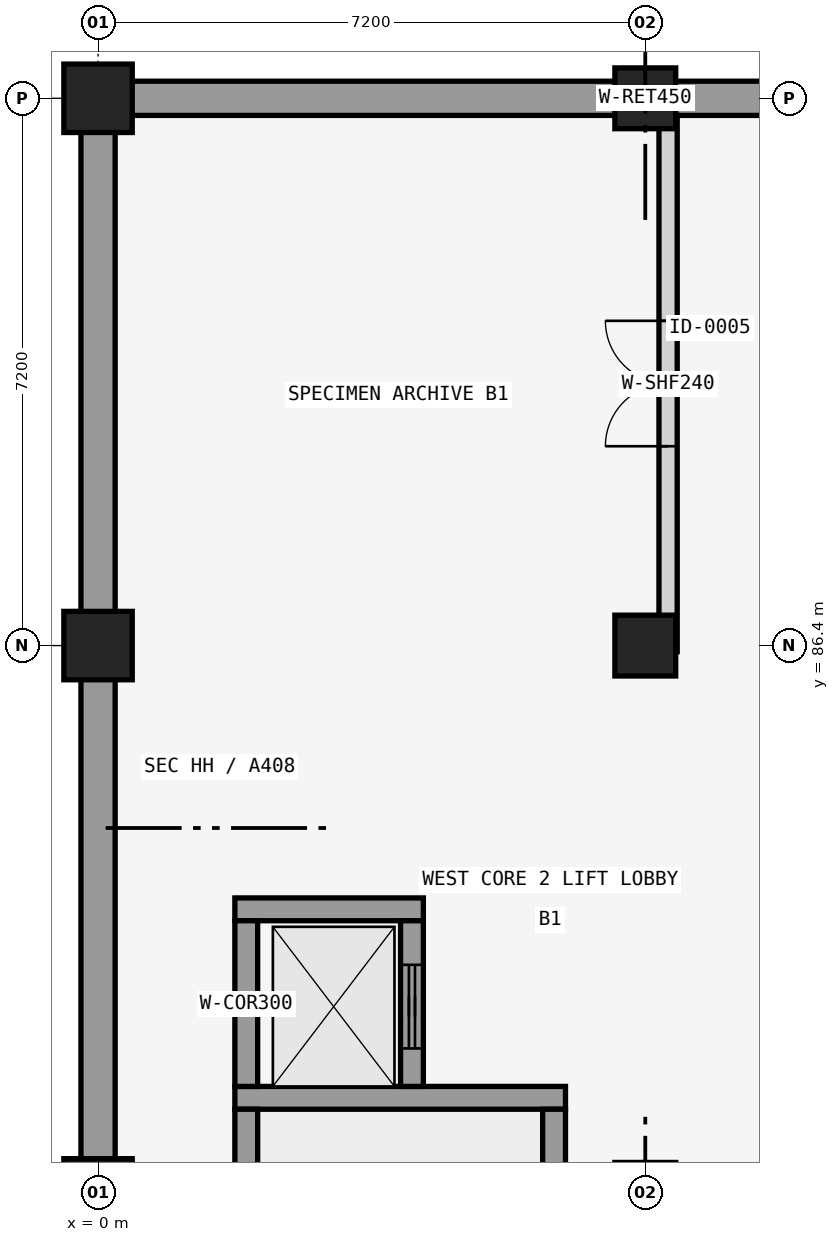
"""IFC4 building model, lengths in metres.
Left out: names, types, materials, properties, quantities, classifications, styles, units other than length and angle.
Written with IfcOpenShell. Run it as: python <this file> out.ifc"""

import sys

from ifc_helpers import new_model, si_unit, direction, frame, frame_2d, origin, origin_2d, place, context, subcontext, project, spatial, rectangle, extrude, element, fill, save


model = new_model("IFC4")
c1 = context("Model", 3, precision=1e-05, world=origin(), true_north=direction((0.0, 1.0)))
c2 = subcontext(c1, "Body", "Model", "MODEL_VIEW")
j1 = project(units=[si_unit("LENGTHUNIT", "METRE"), si_unit("PLANEANGLEUNIT", "RADIAN")], contexts=[c1])
p1 = place(None, origin())
s1 = spatial("IfcSite", under=j1, at=p1, CompositionType="ELEMENT")
p2 = place(p1, origin())
s2 = spatial("IfcBuilding", under=s1, at=p2, CompositionType="ELEMENT")
p3 = place(p2, frame((0.0, 0.0, -4.8)))
s3 = spatial("IfcBuildingStorey", under=s2, at=p3, CompositionType="ELEMENT", Elevation=-4.8)
for number, where, z_axis, x_axis in (
    (1, (0.0, 79.2, 0.0), (0.0, 0.0, 1.0), (1.0, 0.0, 0.0)),
    (2, (0.0, 86.4, 0.0), (0.0, 0.0, 1.0), (1.0, 0.0, 0.0)),
    (3, (0.0, 93.6, 0.0), (0.0, 0.0, 1.0), (1.0, 0.0, 0.0)),
):
    element("IfcColumn", number, at=place(p3, frame(where, z_axis=z_axis, x_axis=x_axis)), inside=s3, PredefinedType="COLUMN", context=c2, shape_type="SweptSolid", body=[
        extrude(rectangle(XDim=0.9, YDim=0.9, at=origin_2d()), origin(), (0.0, 0.0, 1.0), 4.8),
    ])
for number, where, z_axis, x_axis in (
    (4, (7.2, 86.4, 0.0), (0.0, 0.0, 1.0), (1.0, 0.0, 0.0)),
    (5, (7.2, 93.6, 0.0), (0.0, 0.0, 1.0), (1.0, 0.0, 0.0)),
):
    element("IfcColumn", number, at=place(p3, frame(where, z_axis=z_axis, x_axis=x_axis)), inside=s3, PredefinedType="COLUMN", context=c2, shape_type="SweptSolid", body=[
        extrude(rectangle(XDim=0.8, YDim=0.8, at=origin_2d()), origin(), (0.0, 0.0, 1.0), 4.8),
    ])
p4 = place(p3, frame((0.0, 21.0, 0.0), z_axis=(0.0, 0.0, 1.0), x_axis=(0.0, 1.0, 0.0)))
e6 = element("IfcWall", 6, at=p4, inside=s3, PredefinedType="STANDARD", context=c2, shape_type="SweptSolid", body=[
    extrude(rectangle(XDim=72.6, YDim=0.45, at=frame_2d((36.3, 0.0))), origin(), (0.0, 0.0, 1.0), 4.4),
])
p5 = place(p3, frame((0.0, 93.6, 0.0), z_axis=(0.0, 0.0, 1.0), x_axis=(1.0, 0.0, 0.0)))
e7 = element("IfcWall", 7, at=p5, inside=s3, PredefinedType="STANDARD", context=c2, shape_type="SweptSolid", body=[
    extrude(rectangle(XDim=14.4, YDim=0.45, at=frame_2d((7.2, 0.0))), origin(), (0.0, 0.0, 1.0), 4.4),
])
p6 = place(p3, frame((1.8, 80.45, 0.0), z_axis=(0.0, 0.0, 1.0), x_axis=(1.0, 0.0, 0.0)))
e8 = element("IfcWall", 8, at=p6, inside=s3, PredefinedType="SHEAR", context=c2, shape_type="SweptSolid", body=[
    extrude(rectangle(XDim=4.35, YDim=0.3, at=frame_2d((2.175, 0.0))), origin(), (0.0, 0.0, 1.0), 4.4),
])
p7 = place(p3, frame((1.95, 72.5, 0.0), z_axis=(0.0, 0.0, 1.0), x_axis=(0.0, 1.0, 0.0)))
e9 = element("IfcWall", 9, at=p7, inside=s3, PredefinedType="SHEAR", context=c2, shape_type="SweptSolid", body=[
    extrude(rectangle(XDim=7.8, YDim=0.3, at=frame_2d((3.9, 0.0))), origin(), (0.0, 0.0, 1.0), 4.4),
])
p8 = place(p3, frame((6.0, 72.5, 0.0), z_axis=(0.0, 0.0, 1.0), x_axis=(0.0, 1.0, 0.0)))
e10 = element("IfcWall", 10, at=p8, inside=s3, PredefinedType="SHEAR", context=c2, shape_type="SweptSolid", body=[
    extrude(rectangle(XDim=7.8, YDim=0.3, at=frame_2d((3.9, 0.0))), origin(), (0.0, 0.0, 1.0), 4.4),
])
p9 = place(p8, frame((0.4, 0.0, 0.0)))
e11 = element("IfcOpeningElement", 11, at=p9, cuts=e10, PredefinedType="OPENING", context=c2, shape_type="SweptSolid", body=[
    extrude(rectangle(XDim=1.15, YDim=2.2, at=frame_2d((0.575, 1.1))), frame((0.0, 0.16, 0.0), z_axis=(0.0, -1.0, 0.0), x_axis=(1.0, 0.0, 0.0)), (0.0, 0.0, 1.0), 0.32),
])
p10 = place(p3, frame((1.8, 82.93, 0.0), z_axis=(0.0, 0.0, 1.0), x_axis=(1.0, 0.0, 0.0)))
e12 = element("IfcWall", 12, at=p10, inside=s3, PredefinedType="SHEAR", context=c2, shape_type="SweptSolid", body=[
    extrude(rectangle(XDim=2.48, YDim=0.3, at=frame_2d((1.24, 0.0))), origin(), (0.0, 0.0, 1.0), 4.4),
])
p11 = place(p3, frame((1.95, 80.6, 0.0), z_axis=(0.0, 0.0, 1.0), x_axis=(0.0, 1.0, 0.0)))
e13 = element("IfcWall", 13, at=p11, inside=s3, PredefinedType="SHEAR", context=c2, shape_type="SweptSolid", body=[
    extrude(rectangle(XDim=2.18, YDim=0.3, at=frame_2d((1.09, 0.0))), origin(), (0.0, 0.0, 1.0), 4.4),
])
p12 = place(p3, frame((4.13, 80.6, 0.0), z_axis=(0.0, 0.0, 1.0), x_axis=(0.0, 1.0, 0.0)))
e14 = element("IfcWall", 14, at=p12, inside=s3, PredefinedType="SHEAR", context=c2, shape_type="SweptSolid", body=[
    extrude(rectangle(XDim=2.18, YDim=0.3, at=frame_2d((1.09, 0.0))), origin(), (0.0, 0.0, 1.0), 4.4),
])
p13 = place(p12, frame((0.5, 0.0, 0.0)))
e15 = element("IfcOpeningElement", 15, at=p13, cuts=e14, PredefinedType="OPENING", context=c2, shape_type="SweptSolid", body=[
    extrude(rectangle(XDim=1.1, YDim=2.2, at=frame_2d((0.55, 1.1))), frame((0.0, 0.16, 0.0), z_axis=(0.0, -1.0, 0.0), x_axis=(1.0, 0.0, 0.0)), (0.0, 0.0, 1.0), 0.32),
])
p14 = place(p3, frame((7.5, 86.32, 0.0), z_axis=(0.0, 0.0, 1.0), x_axis=(0.0, 1.0, 0.0)))
e16 = element("IfcWall", 16, at=p14, inside=s3, PredefinedType="SOLIDWALL", context=c2, shape_type="SweptSolid", body=[
    extrude(rectangle(XDim=7.055, YDim=0.24, at=frame_2d((3.527, 0.0))), origin(), (0.0, 0.0, 1.0), 3.7),
])
p15 = place(p14, frame((2.702, 0.0, 0.0)))
e17 = element("IfcOpeningElement", 17, at=p15, cuts=e16, PredefinedType="OPENING", context=c2, shape_type="SweptSolid", body=[
    extrude(rectangle(XDim=1.65, YDim=2.3, at=frame_2d((0.825, 1.15))), frame((0.0, 0.13, 0.0), z_axis=(0.0, -1.0, 0.0), x_axis=(1.0, 0.0, 0.0)), (0.0, 0.0, 1.0), 0.26),
])
p16 = place(p13, origin())
e18 = element("IfcDoor", 18, at=p16, inside=s3, OperationType="SLIDING_TO_LEFT", PredefinedType="DOOR", context=c2, shape_type="SweptSolid", body=[
    extrude(rectangle(XDim=1.1, YDim=2.2, at=frame_2d((0.55, 1.1))), frame((0.0, 0.025, 0.0), z_axis=(0.0, -1.0, 0.0), x_axis=(1.0, 0.0, 0.0)), (0.0, 0.0, 1.0), 0.05),
])
fill(e15, e18)
p17 = place(p15, origin())
e19 = element("IfcDoor", 19, at=p17, inside=s3, OperationType="DOUBLE_DOOR_SINGLE_SWING", PredefinedType="DOOR", context=c2, shape_type="SweptSolid", body=[
    extrude(rectangle(XDim=1.65, YDim=2.3, at=frame_2d((0.825, 1.15))), frame((0.0, 0.025, 0.0), z_axis=(0.0, -1.0, 0.0), x_axis=(1.0, 0.0, 0.0)), (0.0, 0.0, 1.0), 0.05),
])
fill(e17, e19)
save(model, sys.argv[1])
